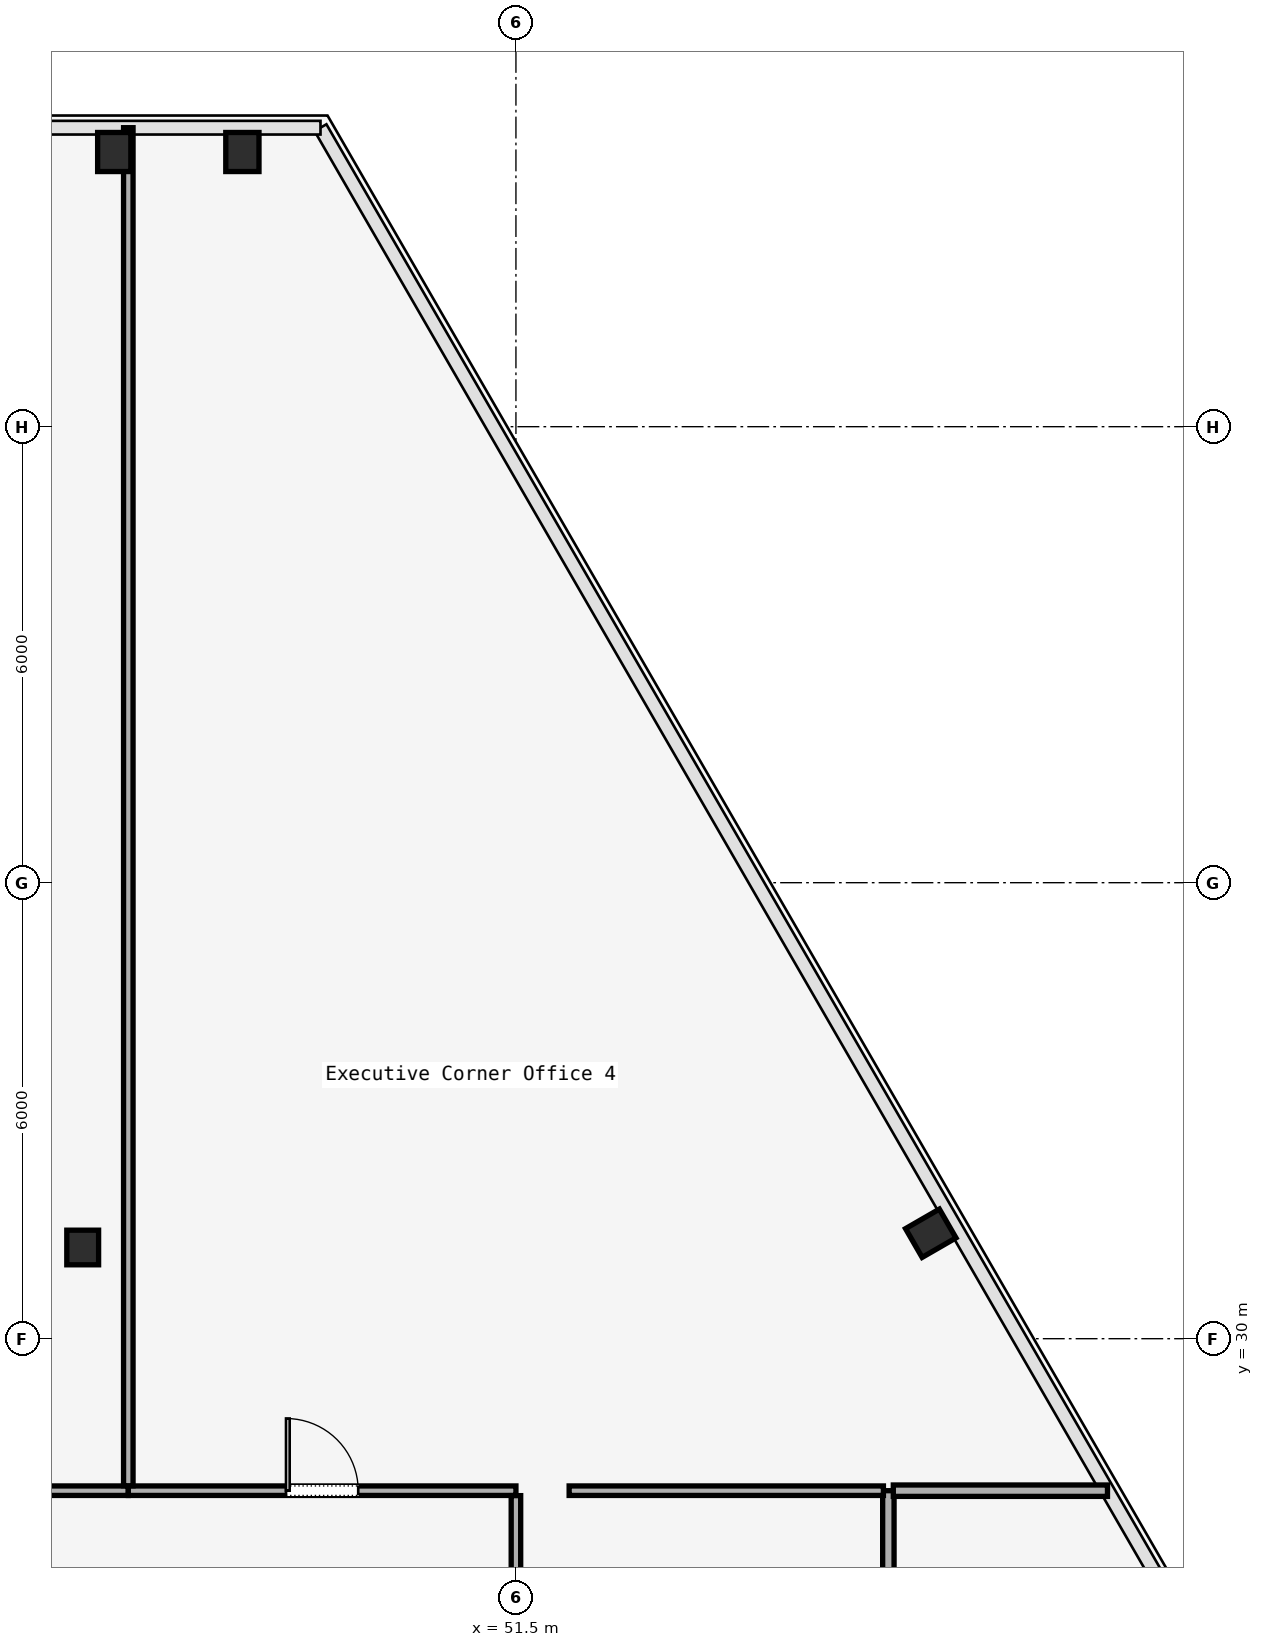
"""IFC4 building model, lengths in metres.
Left out: names, types, materials, properties, quantities, classifications, styles, units other than length and angle.
Written with IfcOpenShell. Run it as: python <this file> out.ifc"""

import sys

from ifc_helpers import new_model, si_unit, direction, frame, frame_2d, origin, origin_2d, place, context, subcontext, project, spatial, rectangle, i_section, extrude, element, fill, save


model = new_model("IFC4")
c1 = context("Model", 3, precision=1e-05, world=origin(), true_north=direction((0.0, 1.0)))
c2 = subcontext(c1, "Body", "Model", "MODEL_VIEW")
j1 = project(units=[si_unit("LENGTHUNIT", "METRE"), si_unit("PLANEANGLEUNIT", "RADIAN")], contexts=[c1])
p1 = place(None, origin())
s1 = spatial("IfcSite", under=j1, at=p1, CompositionType="ELEMENT")
p2 = place(p1, origin())
s2 = spatial("IfcBuilding", under=s1, at=p2, CompositionType="ELEMENT")
p3 = place(p2, frame((0.0, 0.0, 93.0)))
s3 = spatial("IfcBuildingStorey", under=s2, at=p3, CompositionType="ELEMENT", Elevation=93.0)
p4 = place(p3, frame((45.8, 31.2, 0.0), z_axis=(0.0, 0.0, 1.0), x_axis=(1.0, 0.0, 0.0)))
e1 = element("IfcColumn", 1, at=p4, inside=s3, PredefinedType="COLUMN", context=c2, shape_type="SweptSolid", body=[
    extrude(i_section(OverallWidth=0.418, OverallDepth=0.456, WebThickness=0.042, FlangeThickness=0.067, FilletRadius=0.015, at=origin_2d()), origin(), (0.0, 0.0, 1.0), 3.58),
])
for number, where, z_axis, x_axis in (
    (2, (56.958, 31.387, 0.0), (0.0, 0.0, 1.0), (-0.5, 0.866, 0.0)),
    (3, (47.901, 45.614, 0.0), (0.0, 0.0, 1.0), (1.0, 0.0, 0.0)),
    (4, (46.215, 45.614, 0.0), (0.0, 0.0, 1.0), (1.0, 0.0, 0.0)),
):
    element("IfcColumn", number, at=place(p3, frame(where, z_axis=z_axis, x_axis=x_axis)), inside=s3, PredefinedType="COLUMN", context=c2, shape_type="SweptSolid", body=[
        extrude(i_section(OverallWidth=0.437, OverallDepth=0.514, WebThickness=0.061, FlangeThickness=0.077, FilletRadius=0.015, at=origin_2d()), origin(), (0.0, 0.0, 1.0), 3.58),
    ])
p5 = place(p3, frame((40.8, 28.0, 0.0), z_axis=(0.0, 0.0, 1.0), x_axis=(1.0, 0.0, 0.0)))
e5 = element("IfcWall", 5, at=p5, inside=s3, PredefinedType="PARTITIONING", context=c2, shape_type="SweptSolid", body=[
    extrude(rectangle(XDim=5.6, YDim=0.125, at=frame_2d((2.8, 0.0))), origin(), (0.0, 0.0, 1.0), 2.95),
])
p6 = place(p5, frame((2.325, 0.0, 0.0)))
e6 = element("IfcOpeningElement", 6, at=p6, cuts=e5, PredefinedType="OPENING", context=c2, shape_type="SweptSolid", body=[
    extrude(rectangle(XDim=0.95, YDim=2.2, at=frame_2d((0.475, 1.1))), frame((0.0, 0.062, 0.0), z_axis=(0.0, -1.0, 0.0), x_axis=(1.0, 0.0, 0.0)), (0.0, 0.0, 1.0), 0.125),
])
p7 = place(p3, frame((46.4, 28.0, 0.0), z_axis=(0.0, 0.0, 1.0), x_axis=(1.0, 0.0, 0.0)))
e7 = element("IfcWall", 7, at=p7, inside=s3, PredefinedType="PARTITIONING", context=c2, shape_type="SweptSolid", body=[
    extrude(rectangle(XDim=5.1, YDim=0.125, at=frame_2d((2.55, 0.0))), origin(), (0.0, 0.0, 1.0), 2.95),
])
p8 = place(p7, frame((2.075, 0.0, 0.0)))
e8 = element("IfcOpeningElement", 8, at=p8, cuts=e7, PredefinedType="OPENING", context=c2, shape_type="SweptSolid", body=[
    extrude(rectangle(XDim=0.95, YDim=2.2, at=frame_2d((0.475, 1.1))), frame((0.0, 0.062, 0.0), z_axis=(0.0, -1.0, 0.0), x_axis=(1.0, 0.0, 0.0)), (0.0, 0.0, 1.0), 0.125),
])
p9 = place(p3, frame((51.5, 27.935, 0.0), z_axis=(0.0, 0.0, 1.0), x_axis=(0.0, -1.0, 0.0)))
e9 = element("IfcWall", 9, at=p9, inside=s3, PredefinedType="PARTITIONING", context=c2, shape_type="SweptSolid", body=[
    extrude(rectangle(XDim=1.735, YDim=0.125, at=frame_2d((0.868, 0.0))), origin(), (0.0, 0.0, 1.0), 2.95),
])
p10 = place(p3, frame((56.4, 17.065, 0.0), z_axis=(0.0, 0.0, 1.0), x_axis=(0.0, 1.0, 0.0)))
e10 = element("IfcWall", 10, at=p10, inside=s3, PredefinedType="PARTITIONING", context=c2, shape_type="SweptSolid", body=[
    extrude(rectangle(XDim=10.935, YDim=0.15, at=frame_2d((5.468, 0.0))), origin(), (0.0, 0.0, 1.0), 2.95),
])
p11 = place(p3, frame((56.465, 28.0, 0.0), z_axis=(0.0, 0.0, 1.0), x_axis=(1.0, 0.0, 0.0)))
e11 = element("IfcWall", 11, at=p11, inside=s3, PredefinedType="PARTITIONING", context=c2, shape_type="SweptSolid", body=[
    extrude(rectangle(XDim=2.818, YDim=0.15, at=frame_2d((1.409, 0.0))), origin(), (0.0, 0.0, 1.0), 2.95),
])
p12 = place(p3, frame((52.2, 28.0, 0.0), z_axis=(0.0, 0.0, 1.0), x_axis=(1.0, 0.0, 0.0)))
e12 = element("IfcWall", 12, at=p12, inside=s3, PredefinedType="PARTITIONING", context=c2, shape_type="SweptSolid", body=[
    extrude(rectangle(XDim=4.135, YDim=0.125, at=frame_2d((2.067, 0.0))), origin(), (0.0, 0.0, 1.0), 2.95),
])
p13 = place(p3, frame((46.4, 28.065, 0.0), z_axis=(0.0, 0.0, 1.0), x_axis=(0.0, 1.0, 0.0)))
e13 = element("IfcWall", 13, at=p13, inside=s3, PredefinedType="PARTITIONING", context=c2, shape_type="SweptSolid", body=[
    extrude(rectangle(XDim=17.869, YDim=0.125, at=frame_2d((8.935, 0.0))), origin(), (0.0, 0.0, 1.0), 2.95),
])
p14 = place(p8, origin())
e14 = element("IfcDoor", 14, at=p14, inside=s3, OperationType="SINGLE_SWING_RIGHT", PredefinedType="DOOR", context=c2, shape_type="SweptSolid", body=[
    extrude(rectangle(XDim=0.95, YDim=2.2, at=frame_2d((0.475, 1.1))), frame((0.0, 0.025, 0.0), z_axis=(0.0, -1.0, 0.0), x_axis=(1.0, 0.0, 0.0)), (0.0, 0.0, 1.0), 0.05),
])
fill(e8, e14)
save(model, sys.argv[1])
